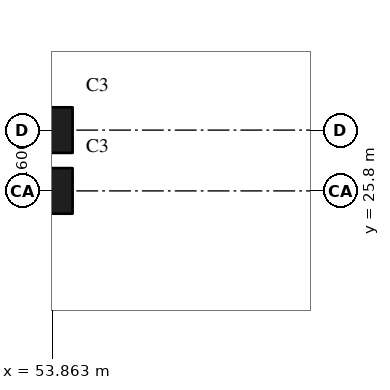
"""IFC4 building model, lengths in metres.
Left out: names, types, materials, properties, quantities, classifications, styles, units other than length and angle.
Written with IfcOpenShell. Run it as: python <this file> out.ifc"""

import sys

from ifc_helpers import new_model, si_unit, direction, frame, origin, origin_2d, place, context, subcontext, project, spatial, rectangle, extrude, element, save


model = new_model("IFC4")
c1 = context("Model", 3, precision=1e-05, world=origin(), true_north=direction((0.0, 1.0)))
c2 = subcontext(c1, "Body", "Model", "MODEL_VIEW")
j1 = project(units=[si_unit("LENGTHUNIT", "METRE"), si_unit("PLANEANGLEUNIT", "RADIAN")], contexts=[c1])
p1 = place(None, origin())
s1 = spatial("IfcSite", under=j1, at=p1, CompositionType="ELEMENT")
p2 = place(p1, origin())
s2 = spatial("IfcBuilding", under=s1, at=p2, CompositionType="ELEMENT")
p3 = place(p2, frame((0.0, 0.0, -12.0)))
s3 = spatial("IfcBuildingStorey", under=s2, at=p3, CompositionType="ELEMENT", Elevation=-12.0)
for number, where, z_axis, x_axis in (
    (1, (53.8, 25.8, 0.0), (0.0, 0.0, 1.0), (1.0, 0.0, 0.0)),
    (2, (53.8, 27.4, 0.0), (0.0, 0.0, 1.0), (1.0, 0.0, 0.0)),
):
    element("IfcColumn", number, at=place(p3, frame(where, z_axis=z_axis, x_axis=x_axis)), inside=s3, PredefinedType="COLUMN", context=c2, shape_type="SweptSolid", body=[
        extrude(rectangle(XDim=1.2, YDim=1.2, at=origin_2d()), origin(), (0.0, 0.0, 1.0), 5.0),
    ])
save(model, sys.argv[1])
